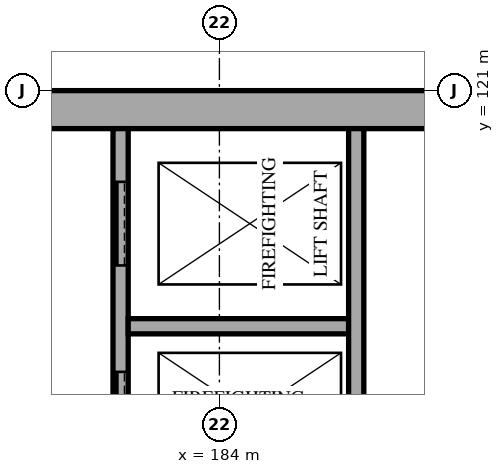
"""IFC4 building model, lengths in metres.
Left out: names, types, materials, properties, quantities, classifications, styles, units other than length and angle.
Written with IfcOpenShell. Run it as: python <this file> out.ifc"""

import sys

from ifc_helpers import new_model, si_unit, direction, frame, frame_2d, origin, place, context, subcontext, project, spatial, rectangle, extrude, element, fill, save


model = new_model("IFC4")
c1 = context("Model", 3, precision=1e-05, world=origin(), true_north=direction((0.0, 1.0)))
c2 = subcontext(c1, "Body", "Model", "MODEL_VIEW")
j1 = project(units=[si_unit("LENGTHUNIT", "METRE"), si_unit("PLANEANGLEUNIT", "RADIAN")], contexts=[c1])
p1 = place(None, origin())
s1 = spatial("IfcSite", under=j1, at=p1, CompositionType="ELEMENT")
p2 = place(p1, origin())
s2 = spatial("IfcBuilding", under=s1, at=p2, CompositionType="ELEMENT")
p3 = place(p2, frame((0.0, 0.0, -8.4)))
s3 = spatial("IfcBuildingStorey", under=s2, at=p3, CompositionType="ELEMENT", Elevation=-8.4)
p4 = place(p3, frame((172.0, 120.75, 0.0), z_axis=(0.0, 0.0, 1.0), x_axis=(1.0, 0.0, 0.0)))
e1 = element("IfcWall", 1, at=p4, inside=s3, PredefinedType="SHEAR", context=c2, shape_type="SweptSolid", body=[
    extrude(rectangle(XDim=18.0, YDim=0.5, at=frame_2d((9.0, 0.0))), origin(), (0.0, 0.0, 1.0), 4.2),
])
p5 = place(p4, frame((8.3, 0.0, 0.0)))
e2 = element("IfcOpeningElement", 2, at=p5, cuts=e1, PredefinedType="OPENING", context=c2, shape_type="SweptSolid", body=[
    extrude(rectangle(XDim=1.2, YDim=2.1, at=frame_2d((0.6, 1.05))), frame((0.0, 0.26, 0.0), z_axis=(0.0, -1.0, 0.0), x_axis=(1.0, 0.0, 0.0)), (0.0, 0.0, 1.0), 0.52),
])
p6 = place(p4, frame((15.2, 0.0, 0.0)))
e3 = element("IfcOpeningElement", 3, at=p6, cuts=e1, PredefinedType="OPENING", context=c2, shape_type="SweptSolid", body=[
    extrude(rectangle(XDim=1.0, YDim=2.1, at=frame_2d((0.5, 1.05))), frame((0.0, 0.26, 0.0), z_axis=(0.0, -1.0, 0.0), x_axis=(1.0, 0.0, 0.0)), (0.0, 0.0, 1.0), 0.52),
])
p7 = place(p3, frame((182.7, 115.7, 0.0), z_axis=(0.0, 0.0, 1.0), x_axis=(0.0, 1.0, 0.0)))
e4 = element("IfcWall", 4, at=p7, inside=s3, PredefinedType="SOLIDWALL", context=c2, shape_type="SweptSolid", body=[
    extrude(rectangle(XDim=4.8, YDim=0.2, at=frame_2d((2.4, 0.0))), origin(), (0.0, 0.0, 1.0), 3.85),
])
p8 = place(p7, frame((0.5, 0.0, 0.0)))
e5 = element("IfcOpeningElement", 5, at=p8, cuts=e4, PredefinedType="OPENING", context=c2, shape_type="SweptSolid", body=[
    extrude(rectangle(XDim=1.1, YDim=2.1, at=frame_2d((0.55, 1.05))), frame((0.0, 0.11, 0.0), z_axis=(0.0, -1.0, 0.0), x_axis=(1.0, 0.0, 0.0)), (0.0, 0.0, 1.0), 0.22),
])
p9 = place(p7, frame((3.0, 0.0, 0.0)))
e6 = element("IfcOpeningElement", 6, at=p9, cuts=e4, PredefinedType="OPENING", context=c2, shape_type="SweptSolid", body=[
    extrude(rectangle(XDim=1.1, YDim=2.1, at=frame_2d((0.55, 1.05))), frame((0.0, 0.11, 0.0), z_axis=(0.0, -1.0, 0.0), x_axis=(1.0, 0.0, 0.0)), (0.0, 0.0, 1.0), 0.22),
])
p10 = place(p3, frame((182.8, 117.9, 0.0), z_axis=(0.0, 0.0, 1.0), x_axis=(1.0, 0.0, 0.0)))
e7 = element("IfcWall", 7, at=p10, inside=s3, PredefinedType="SOLIDWALL", context=c2, shape_type="SweptSolid", body=[
    extrude(rectangle(XDim=2.9, YDim=0.2, at=frame_2d((1.45, 0.0))), origin(), (0.0, 0.0, 1.0), 3.85),
])
p11 = place(p3, frame((185.8, 115.7, 0.0), z_axis=(0.0, 0.0, 1.0), x_axis=(0.0, 1.0, 0.0)))
e8 = element("IfcWall", 8, at=p11, inside=s3, PredefinedType="SOLIDWALL", context=c2, shape_type="SweptSolid", body=[
    extrude(rectangle(XDim=4.8, YDim=0.2, at=frame_2d((2.4, 0.0))), origin(), (0.0, 0.0, 1.0), 3.85),
])
p12 = place(p8, origin())
e9 = element("IfcDoor", 9, at=p12, inside=s3, OperationType="SLIDING_TO_LEFT", PredefinedType="DOOR", context=c2, shape_type="SweptSolid", body=[
    extrude(rectangle(XDim=1.1, YDim=2.1, at=frame_2d((0.55, 1.05))), frame((0.0, 0.025, 0.0), z_axis=(0.0, -1.0, 0.0), x_axis=(1.0, 0.0, 0.0)), (0.0, 0.0, 1.0), 0.05),
])
fill(e5, e9)
p13 = place(p9, origin())
e10 = element("IfcDoor", 10, at=p13, inside=s3, OperationType="SLIDING_TO_LEFT", PredefinedType="DOOR", context=c2, shape_type="SweptSolid", body=[
    extrude(rectangle(XDim=1.1, YDim=2.1, at=frame_2d((0.55, 1.05))), frame((0.0, 0.025, 0.0), z_axis=(0.0, -1.0, 0.0), x_axis=(1.0, 0.0, 0.0)), (0.0, 0.0, 1.0), 0.05),
])
fill(e6, e10)
save(model, sys.argv[1])
